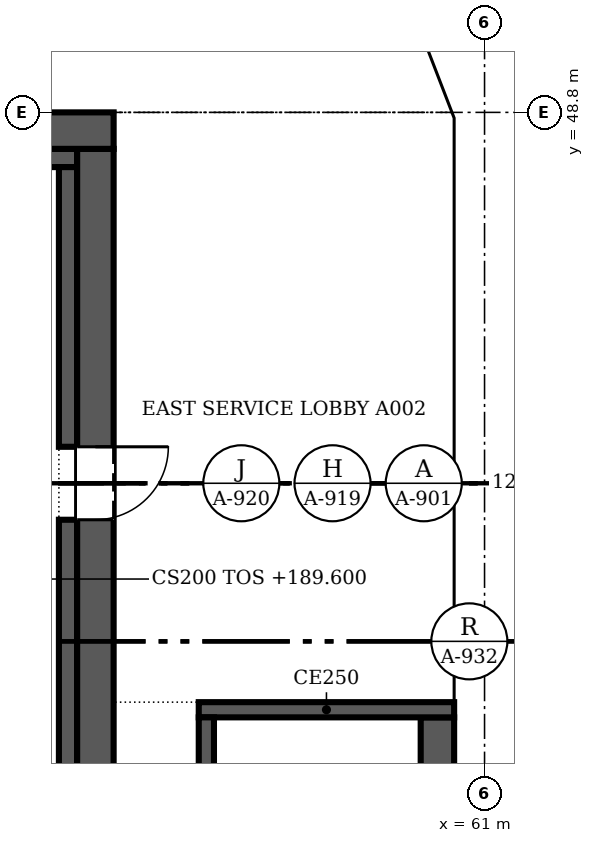
"""IFC4 building model, lengths in metres.
Left out: names, types, materials, properties, quantities, classifications, styles, units other than length and angle.
Written with IfcOpenShell. Run it as: python <this file> out.ifc"""

import sys

from ifc_helpers import new_model, si_unit, direction, frame, frame_2d, origin, place, context, subcontext, project, spatial, polyline, rectangle, outline, extrude, faceted_brep, source, transform, mapped, element, fill, save


model = new_model("IFC4")
c1 = context("Model", 3, precision=1e-05, world=origin(), true_north=direction((0.0, 1.0)))
c2 = subcontext(c1, "Body", "Model", "MODEL_VIEW")
j1 = project(units=[si_unit("LENGTHUNIT", "METRE"), si_unit("PLANEANGLEUNIT", "RADIAN")], contexts=[c1])
p1 = place(None, origin())
s1 = spatial("IfcSite", under=j1, at=p1, CompositionType="ELEMENT")
p2 = place(p1, origin())
s2 = spatial("IfcBuilding", under=s1, at=p2, CompositionType="ELEMENT")
p3 = place(p2, frame((0.0, 0.0, 189.6)))
s3 = spatial("IfcBuildingStorey", under=s2, at=p3, CompositionType="ELEMENT", Elevation=189.6)
m1 = source(origin(), c2, "Body", "Brep", [
    faceted_brep([(3.05, -0.25, 0.0), (6.1, -0.25, 3.8), (6.1, -0.25, 3.8), (3.05, -0.25, 7.6), (0.0, -0.25, 3.8), (0.0, 0.25, 3.8), (3.05, 0.25, 7.6), (6.1, 0.25, 3.8), (6.1, 0.25, 3.8), (3.05, 0.25, 0.0)], [[[0, 1, 2, 3, 4]], [[5, 6, 7, 8, 9]], [[9, 8, 1, 0]], [[7, 6, 3, 2]], [[6, 5, 4, 3]], [[5, 9, 0, 4]], [[1, 8, 7, 2]]]),
])
p4 = place(p3, frame((60.75, 33.55, -3.8), z_axis=(0.0, 0.0, 1.0), x_axis=(0.0, 1.0, 0.0)))
e1 = element("IfcWall", 1, at=p4, inside=s3, PredefinedType="SOLIDWALL", context=c2, shape_type="MappedRepresentation", body=[
    mapped(m1, transform((0.0, 0.0, 0.0), scale=1.0)),
])
m2 = source(origin(), c2, "Body", "SweptSolid", [
    extrude(outline(polyline([(3.05, 0.399), (5.78, 3.8), (3.05, 7.2), (0.321, 3.8), (3.05, 0.399)])), frame((0.0, 0.26, 0.0), z_axis=(0.0, -1.0, 0.0), x_axis=(1.0, 0.0, 0.0)), (0.0, 0.0, 1.0), 0.52),
])
p5 = place(p4, origin())
e2 = element("IfcOpeningElement", 2, at=p5, cuts=e1, PredefinedType="OPENING", context=c2, shape_type="MappedRepresentation", body=[
    mapped(m2, transform((0.0, 0.0, 0.0), scale=1.0)),
])
m3 = source(origin(), c2, "Body", "SweptSolid", [
    extrude(outline(polyline([(3.05, 0.0), (6.1, 3.8), (3.05, 7.6), (0.0, 3.8), (3.05, 0.0)])), frame((0.0, 0.25, 0.0), z_axis=(0.0, -1.0, 0.0), x_axis=(1.0, 0.0, 0.0)), (0.0, 0.0, 1.0), 0.5),
])
p6 = place(p3, frame((60.75, 39.65, -3.8), z_axis=(0.0, 0.0, 1.0), x_axis=(0.0, 1.0, 0.0)))
e3 = element("IfcWall", 3, at=p6, inside=s3, PredefinedType="SOLIDWALL", context=c2, shape_type="MappedRepresentation", body=[
    mapped(m3, transform((0.0, 0.0, 0.0), scale=1.0)),
])
p7 = place(p6, origin())
e4 = element("IfcOpeningElement", 4, at=p7, cuts=e3, PredefinedType="OPENING", context=c2, shape_type="MappedRepresentation", body=[
    mapped(m2, transform((0.0, 0.0, 0.0), scale=1.0)),
])
m4 = source(origin(), c2, "Body", "Brep", [
    faceted_brep([(3.003, -0.25, 0.0), (3.05, -0.25, 0.06), (3.05, -0.25, 7.54), (3.003, -0.25, 7.6), (0.0, -0.25, 3.8), (0.0, 0.25, 3.8), (2.957, 0.25, 7.541), (2.957, 0.25, 0.059), (3.003, 0.0, 0.0), (3.003, 0.0, 7.6)], [[[0, 1, 2, 3, 4]], [[5, 6, 7]], [[1, 0, 8]], [[9, 3, 2]], [[6, 5, 4, 3, 9]], [[5, 7, 8, 0, 4]], [[1, 8, 7, 6, 9, 2]]]),
])
p8 = place(p3, frame((60.75, 45.75, -3.8), z_axis=(0.0, 0.0, 1.0), x_axis=(0.0, 1.0, 0.0)))
e5 = element("IfcWall", 5, at=p8, inside=s3, PredefinedType="SOLIDWALL", context=c2, shape_type="MappedRepresentation", body=[
    mapped(m4, transform((0.0, 0.0, 0.0), scale=1.0)),
])
m5 = source(origin(), c2, "Body", "SweptSolid", [
    extrude(outline(polyline([(2.803, 6.944), (0.319, 3.8), (2.803, 0.656), (2.803, 6.944)])), frame((0.0, 0.26, 0.0), z_axis=(0.0, -1.0, 0.0), x_axis=(1.0, 0.0, 0.0)), (0.0, 0.0, 1.0), 0.52),
])
p9 = place(p8, origin())
e6 = element("IfcOpeningElement", 6, at=p9, cuts=e5, PredefinedType="OPENING", context=c2, shape_type="MappedRepresentation", body=[
    mapped(m5, transform((0.0, 0.0, 0.0), scale=1.0)),
])
m6 = source(origin(), c2, "Body", "Brep", [
    faceted_brep([(0.047, -0.25, 0.0), (2.997, -0.25, 3.8), (0.047, -0.25, 7.6), (0.0, -0.25, 7.541), (0.0, -0.25, 0.059), (0.093, 0.25, 7.54), (2.944, 0.25, 3.868), (2.944, 0.25, 3.732), (0.093, 0.25, 0.06), (2.997, 0.0, 3.8), (0.047, 0.0, 0.0), (0.047, 0.0, 7.6)], [[[0, 1, 2, 3, 4]], [[5, 6, 7, 8]], [[8, 7, 9, 1, 0, 10]], [[6, 5, 11, 2, 1, 9]], [[3, 2, 11]], [[10, 0, 4]], [[8, 10, 4, 3, 11, 5]], [[7, 6, 9]]]),
])
p10 = place(p3, frame((60.767, 48.71, -3.8), z_axis=(0.0, 0.0, 1.0), x_axis=(-0.359901446078, 0.932990326376, 0.0)))
e7 = element("IfcWall", 7, at=p10, inside=s3, PredefinedType="SOLIDWALL", context=c2, shape_type="MappedRepresentation", body=[
    mapped(m6, transform((0.0, 0.0, 0.0), scale=1.0)),
])
m7 = source(origin(), c2, "Body", "SweptSolid", [
    extrude(outline(polyline([(0.247, 0.665), (2.681, 3.8), (0.247, 6.935), (0.247, 0.665)])), frame((0.0, 0.26, 0.0), z_axis=(0.0, -1.0, 0.0), x_axis=(1.0, 0.0, 0.0)), (0.0, 0.0, 1.0), 0.52),
])
p11 = place(p10, origin())
e8 = element("IfcOpeningElement", 8, at=p11, cuts=e7, PredefinedType="OPENING", context=c2, shape_type="MappedRepresentation", body=[
    mapped(m7, transform((0.0, 0.0, 0.0), scale=1.0)),
])
m8 = source(origin(), c2, "Body", "Brep", [
    faceted_brep([(3.05, -0.25, 0.0), (6.1, -0.25, 3.8), (6.1, -0.25, 3.8), (0.0, -0.25, 3.8), (0.0, 0.25, 3.8), (6.1, 0.25, 3.8), (6.1, 0.25, 3.8), (3.05, 0.25, 0.0)], [[[0, 1, 2, 3]], [[4, 5, 6, 7]], [[7, 6, 1, 0]], [[5, 4, 3, 2]], [[4, 7, 0, 3]], [[1, 6, 5, 2]]]),
])
p12 = place(p3, frame((60.75, 36.6, 0.0), z_axis=(0.0, 0.0, 1.0), x_axis=(0.0, 1.0, 0.0)))
e9 = element("IfcWall", 9, at=p12, inside=s3, PredefinedType="SOLIDWALL", context=c2, shape_type="MappedRepresentation", body=[
    mapped(m8, transform((0.0, 0.0, 0.0), scale=1.0)),
])
m9 = source(origin(), c2, "Body", "SweptSolid", [
    extrude(outline(polyline([(3.05, 0.399), (5.579, 3.55), (0.521, 3.55), (3.05, 0.399)])), frame((0.0, 0.26, 0.0), z_axis=(0.0, -1.0, 0.0), x_axis=(1.0, 0.0, 0.0)), (0.0, 0.0, 1.0), 0.52),
])
p13 = place(p12, origin())
e10 = element("IfcOpeningElement", 10, at=p13, cuts=e9, PredefinedType="OPENING", context=c2, shape_type="MappedRepresentation", body=[
    mapped(m9, transform((0.0, 0.0, 0.0), scale=1.0)),
])
m10 = source(origin(), c2, "Body", "Brep", [
    faceted_brep([(3.05, -0.25, 0.0), (6.053, -0.25, 3.8), (0.0, -0.25, 3.8), (0.0, 0.25, 3.8), (6.007, 0.25, 3.8), (6.007, 0.25, 3.741), (3.05, 0.25, 0.0), (6.053, 0.0, 3.8)], [[[0, 1, 2]], [[3, 4, 5, 6]], [[6, 5, 7, 1, 0]], [[4, 3, 2, 1, 7]], [[3, 6, 0, 2]], [[5, 4, 7]]]),
])
p14 = place(p3, frame((60.75, 42.7, 0.0), z_axis=(0.0, 0.0, 1.0), x_axis=(0.0, 1.0, 0.0)))
e11 = element("IfcWall", 11, at=p14, inside=s3, PredefinedType="SOLIDWALL", context=c2, shape_type="MappedRepresentation", body=[
    mapped(m10, transform((0.0, 0.0, 0.0), scale=1.0)),
])
m11 = source(origin(), c2, "Body", "SweptSolid", [
    extrude(outline(polyline([(3.049, 0.401), (5.537, 3.55), (0.521, 3.55), (3.049, 0.401)])), frame((0.0, 0.26, 0.0), z_axis=(0.0, -1.0, 0.0), x_axis=(1.0, 0.0, 0.0)), (0.0, 0.0, 1.0), 0.52),
])
p15 = place(p14, origin())
e12 = element("IfcOpeningElement", 12, at=p15, cuts=e11, PredefinedType="OPENING", context=c2, shape_type="MappedRepresentation", body=[
    mapped(m11, transform((0.0, 0.0, 0.0), scale=1.0)),
])
m12 = source(origin(), c2, "Body", "Brep", [
    faceted_brep([(2.95, -0.25, 0.0), (3.003, -0.25, 0.068), (3.003, -0.25, 3.8), (0.0, -0.25, 3.8), (0.047, 0.25, 3.8), (2.898, 0.25, 3.8), (2.898, 0.25, 0.068), (0.047, 0.25, 3.74), (2.95, 0.0, 0.0), (0.0, 0.0, 3.8)], [[[0, 1, 2, 3]], [[4, 5, 6, 7]], [[1, 0, 8]], [[5, 4, 9, 3, 2]], [[7, 6, 8, 0, 3, 9]], [[7, 9, 4]], [[1, 8, 6, 5, 2]]]),
])
p16 = place(p3, frame((60.75, 48.753, 0.0), z_axis=(0.0, 0.0, 1.0), x_axis=(-0.35992665181, 0.932980602862, 0.0)))
e13 = element("IfcWall", 13, at=p16, inside=s3, PredefinedType="SOLIDWALL", context=c2, shape_type="MappedRepresentation", body=[
    mapped(m12, transform((0.0, 0.0, 0.0), scale=1.0)),
])
m13 = source(origin(), c2, "Body", "SweptSolid", [
    extrude(outline(polyline([(2.75, 3.55), (0.511, 3.55), (2.75, 0.665), (2.75, 3.55)])), frame((0.0, 0.26, 0.0), z_axis=(0.0, -1.0, 0.0), x_axis=(1.0, 0.0, 0.0)), (0.0, 0.0, 1.0), 0.52),
])
p17 = place(p16, origin())
e14 = element("IfcOpeningElement", 14, at=p17, cuts=e13, PredefinedType="OPENING", context=c2, shape_type="MappedRepresentation", body=[
    mapped(m13, transform((0.0, 0.0, 0.0), scale=1.0)),
])
p18 = place(p3, frame((30.5, 48.5, 0.0), z_axis=(0.0, 0.0, 1.0), x_axis=(1.0, 0.0, 0.0)))
e15 = element("IfcWall", 15, at=p18, inside=s3, PredefinedType="SHEAR", context=c2, shape_type="SweptSolid", body=[
    extrude(rectangle(XDim=24.4, YDim=0.6, at=frame_2d((12.2, 0.0))), origin(), (0.0, 0.0, 1.0), 3.8),
])
p19 = place(p3, frame((54.6, 48.2, 0.0), z_axis=(0.0, 0.0, 1.0), x_axis=(0.0, -1.0, 0.0)))
e16 = element("IfcWall", 16, at=p19, inside=s3, PredefinedType="SHEAR", context=c2, shape_type="SweptSolid", body=[
    extrude(rectangle(XDim=23.2, YDim=0.6, at=frame_2d((11.6, 0.0))), origin(), (0.0, 0.0, 1.0), 3.8),
])
m14 = source(origin(), c2, "Body", "SweptSolid", [
    extrude(rectangle(XDim=1.2, YDim=2.1, at=frame_2d((0.6, 1.05))), frame((0.0, 0.31, 0.0), z_axis=(0.0, -1.0, 0.0), x_axis=(1.0, 0.0, 0.0)), (0.0, 0.0, 1.0), 0.62),
])
p20 = place(p19, frame((4.9, 0.0, 0.0)))
e17 = element("IfcOpeningElement", 17, at=p20, cuts=e16, PredefinedType="OPENING", context=c2, shape_type="MappedRepresentation", body=[
    mapped(m14, transform((0.0, 0.0, 0.0), scale=1.0)),
])
p21 = place(p3, frame((31.1, 48.05, 0.0), z_axis=(0.0, 0.0, 1.0), x_axis=(1.0, 0.0, 0.0)))
e18 = element("IfcWall", 18, at=p21, inside=s3, PredefinedType="SOLIDWALL", context=c2, shape_type="SweptSolid", body=[
    extrude(rectangle(XDim=23.2, YDim=0.3, at=frame_2d((11.6, 0.0))), origin(), (0.0, 0.0, 1.0), 3.8),
])
p22 = place(p3, frame((54.15, 36.88, 0.0), z_axis=(0.0, 0.0, 1.0), x_axis=(0.0, 1.0, 0.0)))
e19 = element("IfcWall", 19, at=p22, inside=s3, PredefinedType="SOLIDWALL", context=c2, shape_type="SweptSolid", body=[
    extrude(rectangle(XDim=5.22, YDim=0.3, at=frame_2d((2.61, 0.0))), origin(), (0.0, 0.0, 1.0), 3.8),
])
p23 = place(p3, frame((54.15, 43.3, 0.0), z_axis=(0.0, 0.0, 1.0), x_axis=(0.0, 1.0, 0.0)))
e20 = element("IfcWall", 20, at=p23, inside=s3, PredefinedType="SOLIDWALL", context=c2, shape_type="SweptSolid", body=[
    extrude(rectangle(XDim=4.6, YDim=0.3, at=frame_2d((2.3, 0.0))), origin(), (0.0, 0.0, 1.0), 3.8),
])
p24 = place(p3, frame((56.425, 30.85, 0.0), z_axis=(0.0, 0.0, 1.0), x_axis=(0.0, 1.0, 0.0)))
e21 = element("IfcWall", 21, at=p24, inside=s3, PredefinedType="SOLIDWALL", context=c2, shape_type="SweptSolid", body=[
    extrude(rectangle(XDim=8.0, YDim=0.25, at=frame_2d((4.0, 0.0))), origin(), (0.0, 0.0, 1.0), 3.8),
])
p25 = place(p3, frame((56.3, 38.975, 0.0), z_axis=(0.0, 0.0, 1.0), x_axis=(1.0, 0.0, 0.0)))
e22 = element("IfcWall", 22, at=p25, inside=s3, PredefinedType="SOLIDWALL", context=c2, shape_type="SweptSolid", body=[
    extrude(rectangle(XDim=4.2, YDim=0.25, at=frame_2d((2.1, 0.0))), origin(), (0.0, 0.0, 1.0), 3.8),
])
p26 = place(p3, frame((60.225, 38.85, 0.0), z_axis=(0.0, 0.0, 1.0), x_axis=(0.0, -1.0, 0.0)))
e23 = element("IfcWall", 23, at=p26, inside=s3, PredefinedType="SOLIDWALL", context=c2, shape_type="SweptSolid", body=[
    extrude(rectangle(XDim=8.0, YDim=0.55, at=frame_2d((4.0, 0.0))), origin(), (0.0, 0.0, 1.0), 3.8),
])
m15 = source(origin(), c2, "Body", "SweptSolid", [
    extrude(rectangle(XDim=1.2, YDim=2.1, at=frame_2d((0.6, 1.05))), frame((0.0, 0.025, 0.0), z_axis=(0.0, -1.0, 0.0), x_axis=(1.0, 0.0, 0.0)), (0.0, 0.0, 1.0), 0.05),
])
p27 = place(p20, origin())
e24 = element("IfcDoor", 24, at=p27, inside=s3, OperationType="SINGLE_SWING_LEFT", PredefinedType="DOOR", context=c2, shape_type="MappedRepresentation", body=[
    mapped(m15, transform((0.0, 0.0, 0.0), scale=1.0)),
])
fill(e17, e24)
save(model, sys.argv[1])
